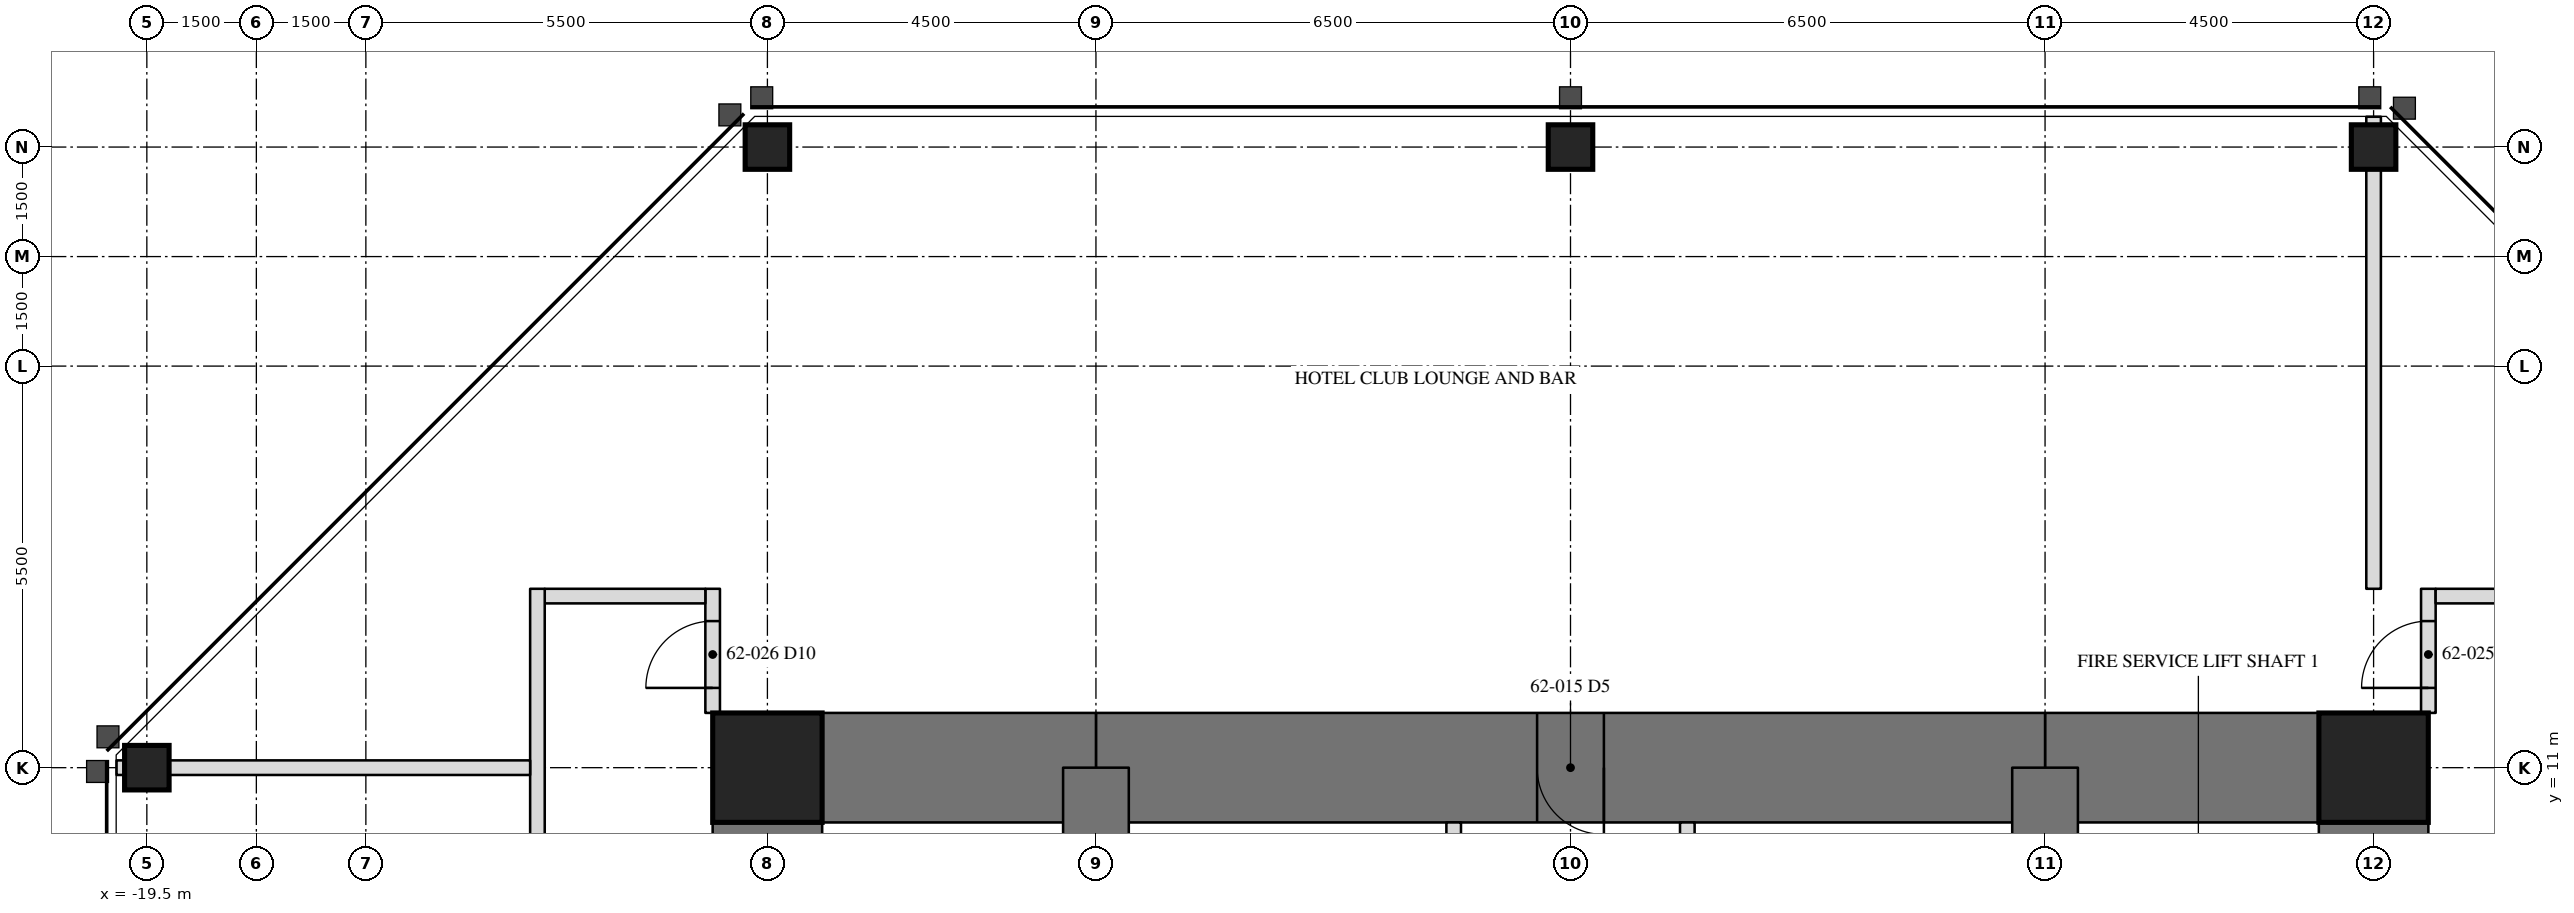
"""IFC4 building model, lengths in metres.
Left out: names, types, materials, properties, quantities, classifications, styles, units other than length and angle.
Written with IfcOpenShell. Run it as: python <this file> out.ifc"""

import sys

from ifc_helpers import new_model, si_unit, direction, frame, frame_2d, origin, origin_2d, place, context, subcontext, project, spatial, rectangle, hollow_rectangle, extrude, element, fill, save


model = new_model("IFC4")
c1 = context("Model", 3, precision=1e-05, world=origin(), true_north=direction((0.0, 1.0)))
c2 = subcontext(c1, "Body", "Model", "MODEL_VIEW")
j1 = project(units=[si_unit("LENGTHUNIT", "METRE"), si_unit("PLANEANGLEUNIT", "RADIAN")], contexts=[c1])
p1 = place(None, origin())
s1 = spatial("IfcSite", under=j1, at=p1, CompositionType="ELEMENT")
p2 = place(p1, origin())
s2 = spatial("IfcBuilding", under=s1, at=p2, CompositionType="ELEMENT")
p3 = place(p2, frame((0.0, 0.0, 253.7)))
s3 = spatial("IfcBuildingStorey", under=s2, at=p3, CompositionType="ELEMENT", Elevation=253.7)
for number, where, z_axis, x_axis in (
    (1, (11.0, 19.5, 0.0), (0.0, 0.0, 1.0), (1.0, 0.0, 0.0)),
    (2, (0.0, 19.5, 0.0), (0.0, 0.0, 1.0), (1.0, 0.0, 0.0)),
    (3, (-11.0, 19.5, 0.0), (0.0, 0.0, 1.0), (1.0, 0.0, 0.0)),
    (4, (-19.5, 11.0, 0.0), (0.0, 0.0, 1.0), (0.0, 1.0, 0.0)),
):
    element("IfcColumn", number, at=place(p3, frame(where, z_axis=z_axis, x_axis=x_axis)), inside=s3, PredefinedType="COLUMN", context=c2, shape_type="SweptSolid", body=[
        extrude(hollow_rectangle(XDim=0.61, YDim=0.61, WallThickness=0.051, at=origin_2d()), origin(), (0.0, 0.0, 1.0), 3.5),
    ])
p4 = place(p3, frame((11.0, -11.0, 0.0), z_axis=(0.0, 0.0, 1.0), x_axis=(0.0, 1.0, 0.0)))
e5 = element("IfcWall", 5, at=p4, inside=s3, PredefinedType="SHEAR", context=c2, shape_type="SweptSolid", body=[
    extrude(rectangle(XDim=22.0, YDim=1.5, at=frame_2d((11.0, 0.0))), origin(), (0.0, 0.0, 1.0), 3.5),
])
p5 = place(p4, frame((15.393, 0.0, 0.0)))
e6 = element("IfcOpeningElement", 6, at=p5, cuts=e5, PredefinedType="OPENING", context=c2, shape_type="SweptSolid", body=[
    extrude(rectangle(XDim=0.915, YDim=2.134, at=frame_2d((0.458, 1.067))), frame((0.0, 0.76, 0.0), z_axis=(0.0, -1.0, 0.0), x_axis=(1.0, 0.0, 0.0)), (0.0, 0.0, 1.0), 1.52),
])
p6 = place(p3, frame((-11.0, 11.0, 0.0), z_axis=(0.0, 0.0, 1.0), x_axis=(0.0, -1.0, 0.0)))
e7 = element("IfcWall", 7, at=p6, inside=s3, PredefinedType="SHEAR", context=c2, shape_type="SweptSolid", body=[
    extrude(rectangle(XDim=22.0, YDim=1.5, at=frame_2d((11.0, 0.0))), origin(), (0.0, 0.0, 1.0), 3.5),
])
p7 = place(p6, frame((15.393, 0.0, 0.0)))
e8 = element("IfcOpeningElement", 8, at=p7, cuts=e7, PredefinedType="OPENING", context=c2, shape_type="SweptSolid", body=[
    extrude(rectangle(XDim=0.915, YDim=2.134, at=frame_2d((0.458, 1.067))), frame((0.0, 0.76, 0.0), z_axis=(0.0, -1.0, 0.0), x_axis=(1.0, 0.0, 0.0)), (0.0, 0.0, 1.0), 1.52),
])
p8 = place(p3, frame((11.0, 11.0, 0.0), z_axis=(0.0, 0.0, 1.0), x_axis=(-1.0, 0.0, 0.0)))
e9 = element("IfcWall", 9, at=p8, inside=s3, PredefinedType="SHEAR", context=c2, shape_type="SweptSolid", body=[
    extrude(rectangle(XDim=4.5, YDim=1.5, at=frame_2d((2.25, 0.0))), origin(), (0.0, 0.0, 1.0), 3.5),
])
p9 = place(p3, frame((6.5, 11.0, 0.0), z_axis=(0.0, 0.0, 1.0), x_axis=(-1.0, 0.0, 0.0)))
e10 = element("IfcWall", 10, at=p9, inside=s3, PredefinedType="SHEAR", context=c2, shape_type="SweptSolid", body=[
    extrude(rectangle(XDim=13.0, YDim=1.5, at=frame_2d((6.5, 0.0))), origin(), (0.0, 0.0, 1.0), 3.5),
])
p10 = place(p9, frame((6.042, 0.0, 0.0)))
e11 = element("IfcOpeningElement", 11, at=p10, cuts=e10, PredefinedType="OPENING", context=c2, shape_type="SweptSolid", body=[
    extrude(rectangle(XDim=0.915, YDim=2.134, at=frame_2d((0.458, 1.067))), frame((0.0, 0.76, 0.0), z_axis=(0.0, -1.0, 0.0), x_axis=(1.0, 0.0, 0.0)), (0.0, 0.0, 1.0), 1.52),
])
p11 = place(p3, frame((-6.5, 11.0, 0.0), z_axis=(0.0, 0.0, 1.0), x_axis=(-1.0, 0.0, 0.0)))
e12 = element("IfcWall", 12, at=p11, inside=s3, PredefinedType="SHEAR", context=c2, shape_type="SweptSolid", body=[
    extrude(rectangle(XDim=4.5, YDim=1.5, at=frame_2d((2.25, 0.0))), origin(), (0.0, 0.0, 1.0), 3.5),
])
for number, where, z_axis, x_axis in (
    (13, (6.5, 6.5, 0.0), (0.0, 0.0, 1.0), (0.0, 1.0, 0.0)),
    (14, (-6.5, 11.0, 0.0), (0.0, 0.0, 1.0), (0.0, -1.0, 0.0)),
):
    element("IfcWall", number, at=place(p3, frame(where, z_axis=z_axis, x_axis=x_axis)), inside=s3, PredefinedType="SHEAR", context=c2, shape_type="SweptSolid", body=[
        extrude(rectangle(XDim=4.5, YDim=0.9, at=frame_2d((2.25, 0.0))), origin(), (0.0, 0.0, 1.0), 3.5),
    ])
for number, where, z_axis, x_axis in (
    (15, (11.0, 11.0, 0.0), (0.0, 0.0, 1.0), (1.0, 0.0, 0.0)),
    (16, (-11.0, 11.0, 0.0), (0.0, 0.0, 1.0), (1.0, 0.0, 0.0)),
):
    element("IfcColumn", number, at=place(p3, frame(where, z_axis=z_axis, x_axis=x_axis)), inside=s3, PredefinedType="COLUMN", context=c2, shape_type="SweptSolid", body=[
        extrude(hollow_rectangle(XDim=1.499, YDim=1.499, WallThickness=0.102, at=origin_2d()), origin(), (0.0, 0.0, 1.0), 3.5),
    ])
p12 = place(p3, frame((-1.6, 6.95, 0.0), z_axis=(0.0, 0.0, 1.0), x_axis=(0.0, 1.0, 0.0)))
e17 = element("IfcWall", 17, at=p12, inside=s3, PredefinedType="PARTITIONING", context=c2, shape_type="SweptSolid", body=[
    extrude(rectangle(XDim=3.3, YDim=0.2, at=frame_2d((1.65, 0.0))), origin(), (0.0, 0.0, 1.0), 3.31),
])
p13 = place(p12, frame((1.192, 0.0, 0.0)))
e18 = element("IfcOpeningElement", 18, at=p13, cuts=e17, PredefinedType="OPENING", context=c2, shape_type="SweptSolid", body=[
    extrude(rectangle(XDim=0.915, YDim=2.134, at=frame_2d((0.458, 1.067))), frame((0.0, 0.11, 0.0), z_axis=(0.0, -1.0, 0.0), x_axis=(1.0, 0.0, 0.0)), (0.0, 0.0, 1.0), 0.22),
])
p14 = place(p3, frame((1.6, 6.95, 0.0), z_axis=(0.0, 0.0, 1.0), x_axis=(0.0, 1.0, 0.0)))
e19 = element("IfcWall", 19, at=p14, inside=s3, PredefinedType="PARTITIONING", context=c2, shape_type="SweptSolid", body=[
    extrude(rectangle(XDim=3.3, YDim=0.2, at=frame_2d((1.65, 0.0))), origin(), (0.0, 0.0, 1.0), 3.31),
])
p15 = place(p14, frame((1.192, 0.0, 0.0)))
e20 = element("IfcOpeningElement", 20, at=p15, cuts=e19, PredefinedType="OPENING", context=c2, shape_type="SweptSolid", body=[
    extrude(rectangle(XDim=0.915, YDim=2.134, at=frame_2d((0.458, 1.067))), frame((0.0, 0.11, 0.0), z_axis=(0.0, -1.0, 0.0), x_axis=(1.0, 0.0, 0.0)), (0.0, 0.0, 1.0), 0.22),
])
p16 = place(p3, frame((11.75, 11.75, 0.0), z_axis=(0.0, 0.0, 1.0), x_axis=(0.0, 1.0, 0.0)))
e21 = element("IfcWall", 21, at=p16, inside=s3, PredefinedType="PARTITIONING", context=c2, shape_type="SweptSolid", body=[
    extrude(rectangle(XDim=1.7, YDim=0.2, at=frame_2d((0.85, 0.0))), origin(), (0.0, 0.0, 1.0), 3.31),
])
p17 = place(p16, frame((0.343, 0.0, 0.0)))
e22 = element("IfcOpeningElement", 22, at=p17, cuts=e21, PredefinedType="OPENING", context=c2, shape_type="SweptSolid", body=[
    extrude(rectangle(XDim=0.915, YDim=2.134, at=frame_2d((0.458, 1.067))), frame((0.0, 0.11, 0.0), z_axis=(0.0, -1.0, 0.0), x_axis=(1.0, 0.0, 0.0)), (0.0, 0.0, 1.0), 0.22),
])
p18 = place(p3, frame((-11.75, 11.75, 0.0), z_axis=(0.0, 0.0, 1.0), x_axis=(0.0, 1.0, 0.0)))
e23 = element("IfcWall", 23, at=p18, inside=s3, PredefinedType="PARTITIONING", context=c2, shape_type="SweptSolid", body=[
    extrude(rectangle(XDim=1.7, YDim=0.2, at=frame_2d((0.85, 0.0))), origin(), (0.0, 0.0, 1.0), 3.31),
])
p19 = place(p18, frame((0.343, 0.0, 0.0)))
e24 = element("IfcOpeningElement", 24, at=p19, cuts=e23, PredefinedType="OPENING", context=c2, shape_type="SweptSolid", body=[
    extrude(rectangle(XDim=0.915, YDim=2.134, at=frame_2d((0.458, 1.067))), frame((0.0, 0.11, 0.0), z_axis=(0.0, -1.0, 0.0), x_axis=(1.0, 0.0, 0.0)), (0.0, 0.0, 1.0), 0.22),
])
p20 = place(p3, frame((13.45, 13.35, 0.0), z_axis=(0.0, 0.0, 1.0), x_axis=(-1.0, 0.0, 0.0)))
e25 = element("IfcWall", 25, at=p20, inside=s3, PredefinedType="PARTITIONING", context=c2, shape_type="SweptSolid", body=[
    extrude(rectangle(XDim=1.6, YDim=0.2, at=frame_2d((0.8, 0.0))), origin(), (0.0, 0.0, 1.0), 3.31),
])
p21 = place(p3, frame((-11.85, 13.35, 0.0), z_axis=(0.0, 0.0, 1.0), x_axis=(-1.0, 0.0, 0.0)))
e26 = element("IfcWall", 26, at=p21, inside=s3, PredefinedType="PARTITIONING", context=c2, shape_type="SweptSolid", body=[
    extrude(rectangle(XDim=2.2, YDim=0.2, at=frame_2d((1.1, 0.0))), origin(), (0.0, 0.0, 1.0), 3.31),
])
p22 = place(p3, frame((-14.15, 13.45, 0.0), z_axis=(0.0, 0.0, 1.0), x_axis=(0.0, -1.0, 0.0)))
e27 = element("IfcWall", 27, at=p22, inside=s3, PredefinedType="PARTITIONING", context=c2, shape_type="SweptSolid", body=[
    extrude(rectangle(XDim=26.7, YDim=0.2, at=frame_2d((13.35, 0.0))), origin(), (0.0, 0.0, 1.0), 3.31),
])
p23 = place(p22, frame((4.718, 0.0, 0.0)))
e28 = element("IfcOpeningElement", 28, at=p23, cuts=e27, PredefinedType="OPENING", context=c2, shape_type="SweptSolid", body=[
    extrude(rectangle(XDim=0.915, YDim=2.134, at=frame_2d((0.458, 1.067))), frame((0.0, 0.11, 0.0), z_axis=(0.0, -1.0, 0.0), x_axis=(1.0, 0.0, 0.0)), (0.0, 0.0, 1.0), 0.22),
])
p24 = place(p22, frame((15.8, 0.0, 0.0)))
e29 = element("IfcOpeningElement", 29, at=p24, cuts=e27, PredefinedType="OPENING", context=c2, shape_type="SweptSolid", body=[
    extrude(rectangle(XDim=0.915, YDim=2.134, at=frame_2d((0.458, 1.067))), frame((0.0, 0.11, 0.0), z_axis=(0.0, -1.0, 0.0), x_axis=(1.0, 0.0, 0.0)), (0.0, 0.0, 1.0), 0.22),
])
p25 = place(p3, frame((11.0, 13.45, 0.0), z_axis=(0.0, 0.0, 1.0), x_axis=(0.0, 1.0, 0.0)))
e30 = element("IfcWall", 30, at=p25, inside=s3, PredefinedType="PARTITIONING", context=c2, shape_type="SweptSolid", body=[
    extrude(rectangle(XDim=6.465, YDim=0.2, at=frame_2d((3.232, 0.0))), origin(), (0.0, 0.0, 1.0), 2.383),
])
p26 = place(p3, frame((-14.25, 11.0, 0.0), z_axis=(0.0, 0.0, 1.0), x_axis=(-1.0, 0.0, 0.0)))
e31 = element("IfcWall", 31, at=p26, inside=s3, PredefinedType="PARTITIONING", context=c2, shape_type="SweptSolid", body=[
    extrude(rectangle(XDim=5.665, YDim=0.2, at=frame_2d((2.833, 0.0))), origin(), (0.0, 0.0, 1.0), 2.383),
])
p27 = place(p10, origin())
e32 = element("IfcDoor", 32, at=p27, inside=s3, OperationType="SINGLE_SWING_RIGHT", PredefinedType="DOOR", context=c2, shape_type="SweptSolid", body=[
    extrude(rectangle(XDim=0.915, YDim=2.134, at=frame_2d((0.458, 1.067))), frame((0.0, 0.025, 0.0), z_axis=(0.0, -1.0, 0.0), x_axis=(1.0, 0.0, 0.0)), (0.0, 0.0, 1.0), 0.05),
])
fill(e11, e32)
p28 = place(p17, origin())
e33 = element("IfcDoor", 33, at=p28, inside=s3, OperationType="SINGLE_SWING_LEFT", PredefinedType="DOOR", context=c2, shape_type="SweptSolid", body=[
    extrude(rectangle(XDim=0.915, YDim=2.134, at=frame_2d((0.458, 1.067))), frame((0.0, 0.025, 0.0), z_axis=(0.0, -1.0, 0.0), x_axis=(1.0, 0.0, 0.0)), (0.0, 0.0, 1.0), 0.05),
])
fill(e22, e33)
p29 = place(p19, origin())
e34 = element("IfcDoor", 34, at=p29, inside=s3, OperationType="SINGLE_SWING_LEFT", PredefinedType="DOOR", context=c2, shape_type="SweptSolid", body=[
    extrude(rectangle(XDim=0.915, YDim=2.134, at=frame_2d((0.458, 1.067))), frame((0.0, 0.025, 0.0), z_axis=(0.0, -1.0, 0.0), x_axis=(1.0, 0.0, 0.0)), (0.0, 0.0, 1.0), 0.05),
])
fill(e24, e34)
save(model, sys.argv[1])
